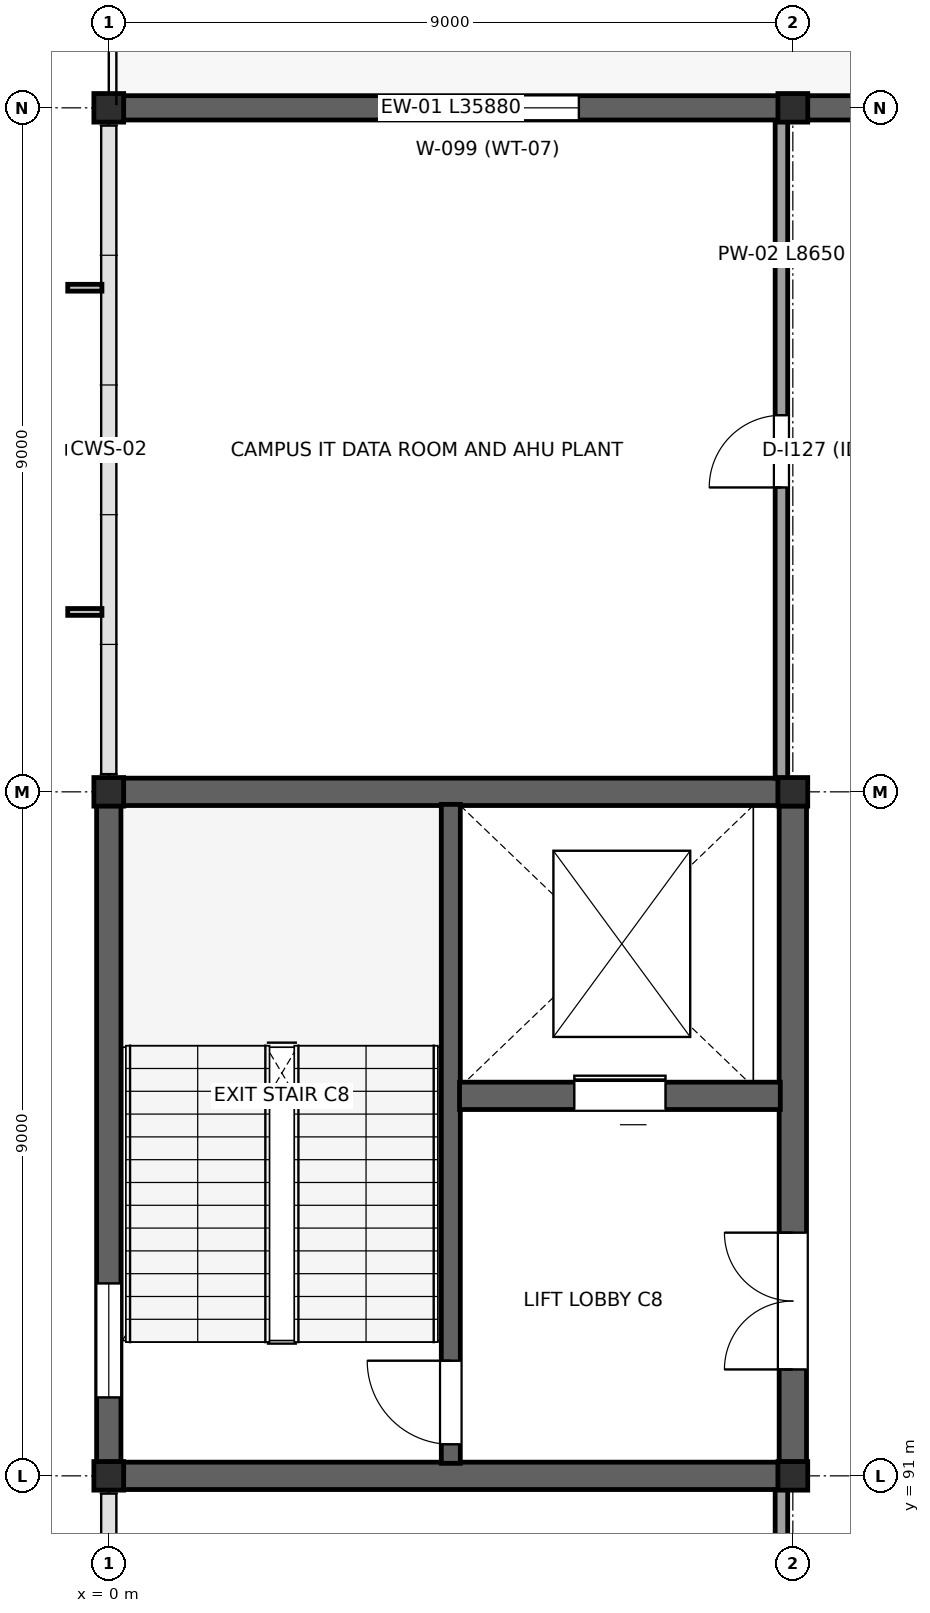
"""IFC4 building model, lengths in metres.
Left out: names, types, materials, properties, quantities, classifications, styles, units other than length and angle.
Written with IfcOpenShell. Run it as: python <this file> out.ifc"""

import sys

from ifc_helpers import new_model, si_unit, direction, frame, frame_2d, origin, origin_2d, place, context, subcontext, project, spatial, rectangle, i_section, extrude, element, fill, save


model = new_model("IFC4")
c1 = context("Model", 3, precision=1e-05, world=origin(), true_north=direction((0.0, 1.0)))
c2 = subcontext(c1, "Body", "Model", "MODEL_VIEW")
j1 = project(units=[si_unit("LENGTHUNIT", "METRE"), si_unit("PLANEANGLEUNIT", "RADIAN")], contexts=[c1])
p1 = place(None, origin())
s1 = spatial("IfcSite", under=j1, at=p1, CompositionType="ELEMENT")
p2 = place(p1, origin())
s2 = spatial("IfcBuilding", under=s1, at=p2, CompositionType="ELEMENT")
p3 = place(p2, frame((0.0, 0.0, 16.5)))
s3 = spatial("IfcBuildingStorey", under=s2, at=p3, CompositionType="ELEMENT", Elevation=16.5)
for number, where, z_axis, x_axis in (
    (1, (0.0, 91.0, 0.0), (0.0, 0.0, 1.0), (1.0, 0.0, 0.0)),
    (2, (0.0, 100.0, 0.0), (0.0, 0.0, 1.0), (1.0, 0.0, 0.0)),
    (3, (0.0, 109.0, 0.0), (0.0, 0.0, 1.0), (1.0, 0.0, 0.0)),
    (4, (9.0, 91.0, 0.0), (0.0, 0.0, 1.0), (1.0, 0.0, 0.0)),
    (5, (9.0, 100.0, 0.0), (0.0, 0.0, 1.0), (1.0, 0.0, 0.0)),
    (6, (9.0, 109.0, 0.0), (0.0, 0.0, 1.0), (1.0, 0.0, 0.0)),
):
    element("IfcColumn", number, at=place(p3, frame(where, z_axis=z_axis, x_axis=x_axis)), inside=s3, PredefinedType="COLUMN", context=c2, shape_type="SweptSolid", body=[
        extrude(i_section(OverallWidth=0.392, OverallDepth=0.376, WebThickness=0.017, FlangeThickness=0.028, at=origin_2d()), origin(), (0.0, 0.0, 1.0), 4.5),
    ])
p4 = place(p3, frame((0.0, 91.182, 0.0), z_axis=(0.0, 0.0, 1.0), x_axis=(0.0, 1.0, 0.0)))
e7 = element("IfcWall", 7, at=p4, inside=s3, PredefinedType="STANDARD", context=c2, shape_type="SweptSolid", body=[
    extrude(rectangle(XDim=8.636, YDim=0.32, at=frame_2d((4.318, 0.0))), origin(), (0.0, 0.0, 1.0), 4.28),
])
p5 = place(p4, frame((0.85, 0.0, 1.1)))
e8 = element("IfcOpeningElement", 8, at=p5, cuts=e7, PredefinedType="OPENING", context=c2, shape_type="SweptSolid", body=[
    extrude(rectangle(XDim=1.5, YDim=1.8, at=frame_2d((0.75, 0.9))), frame((0.0, 0.17, 0.0), z_axis=(0.0, -1.0, 0.0), x_axis=(1.0, 0.0, 0.0)), (0.0, 0.0, 1.0), 0.34),
])
p6 = place(p3, frame((0.015, 109.0, 0.0), z_axis=(0.0, 0.0, 1.0), x_axis=(1.0, 0.0, 0.0)))
e9 = element("IfcWall", 9, at=p6, inside=s3, PredefinedType="STANDARD", context=c2, shape_type="SweptSolid", body=[
    extrude(rectangle(XDim=8.97, YDim=0.32, at=frame_2d((4.485, 0.0))), origin(), (0.0, 0.0, 1.0), 4.28),
])
p7 = place(p6, frame((3.77, 0.0, 1.0)))
e10 = element("IfcOpeningElement", 10, at=p7, cuts=e9, PredefinedType="OPENING", context=c2, shape_type="SweptSolid", body=[
    extrude(rectangle(XDim=2.4, YDim=2.4, at=frame_2d((1.2, 1.2))), frame((0.0, 0.17, 0.0), z_axis=(0.0, -1.0, 0.0), x_axis=(1.0, 0.0, 0.0)), (0.0, 0.0, 1.0), 0.34),
])
p8 = place(p3, frame((9.015, 109.0, 0.0), z_axis=(0.0, 0.0, 1.0), x_axis=(1.0, 0.0, 0.0)))
e11 = element("IfcWall", 11, at=p8, inside=s3, PredefinedType="STANDARD", context=c2, shape_type="SweptSolid", body=[
    extrude(rectangle(XDim=8.97, YDim=0.32, at=frame_2d((4.485, 0.0))), origin(), (0.0, 0.0, 1.0), 4.28),
])
p9 = place(p3, frame((9.0, 91.183, 0.0), z_axis=(0.0, 0.0, 1.0), x_axis=(0.0, 1.0, 0.0)))
e12 = element("IfcWall", 12, at=p9, inside=s3, PredefinedType="SHEAR", context=c2, shape_type="SweptSolid", body=[
    extrude(rectangle(XDim=8.634, YDim=0.36, at=frame_2d((4.317, 0.0))), origin(), (0.0, 0.0, 1.0), 4.28),
])
p10 = place(p9, frame((1.217, 0.0, 0.0)))
e13 = element("IfcOpeningElement", 13, at=p10, cuts=e12, PredefinedType="OPENING", context=c2, shape_type="SweptSolid", body=[
    extrude(rectangle(XDim=1.8, YDim=2.3, at=frame_2d((0.9, 1.15))), frame((0.0, 0.19, 0.0), z_axis=(0.0, -1.0, 0.0), x_axis=(1.0, 0.0, 0.0)), (0.0, 0.0, 1.0), 0.38),
])
for number, where, z_axis, x_axis in (
    (14, (0.191, 91.0, 0.0), (0.0, 0.0, 1.0), (1.0, 0.0, 0.0)),
    (15, (0.191, 100.0, 0.0), (0.0, 0.0, 1.0), (1.0, 0.0, 0.0)),
):
    element("IfcWall", number, at=place(p3, frame(where, z_axis=z_axis, x_axis=x_axis)), inside=s3, PredefinedType="SHEAR", context=c2, shape_type="SweptSolid", body=[
        extrude(rectangle(XDim=8.618, YDim=0.36, at=frame_2d((4.309, 0.0))), origin(), (0.0, 0.0, 1.0), 4.28),
    ])
p11 = place(p3, frame((4.5, 91.165, 0.0), z_axis=(0.0, 0.0, 1.0), x_axis=(0.0, 1.0, 0.0)))
e16 = element("IfcWall", 16, at=p11, inside=s3, PredefinedType="SHEAR", context=c2, shape_type="SweptSolid", body=[
    extrude(rectangle(XDim=8.67, YDim=0.25, at=frame_2d((4.335, 0.0))), origin(), (0.0, 0.0, 1.0), 4.28),
])
p12 = place(p11, frame((0.25, 0.0, 0.0)))
e17 = element("IfcOpeningElement", 17, at=p12, cuts=e16, PredefinedType="OPENING", context=c2, shape_type="SweptSolid", body=[
    extrude(rectangle(XDim=1.1, YDim=2.2, at=frame_2d((0.55, 1.1))), frame((0.0, 0.135, 0.0), z_axis=(0.0, -1.0, 0.0), x_axis=(1.0, 0.0, 0.0)), (0.0, 0.0, 1.0), 0.27),
])
p13 = place(p3, frame((4.615, 96.0, 0.0), z_axis=(0.0, 0.0, 1.0), x_axis=(1.0, 0.0, 0.0)))
e18 = element("IfcWall", 18, at=p13, inside=s3, PredefinedType="SHEAR", context=c2, shape_type="SweptSolid", body=[
    extrude(rectangle(XDim=4.22, YDim=0.36, at=frame_2d((2.11, 0.0))), origin(), (0.0, 0.0, 1.0), 4.28),
])
p14 = place(p13, frame((1.51, 0.0, 0.0)))
e19 = element("IfcOpeningElement", 19, at=p14, cuts=e18, PredefinedType="OPENING", context=c2, shape_type="SweptSolid", body=[
    extrude(rectangle(XDim=1.2, YDim=2.3, at=frame_2d((0.6, 1.15))), frame((0.0, 0.19, 0.0), z_axis=(0.0, -1.0, 0.0), x_axis=(1.0, 0.0, 0.0)), (0.0, 0.0, 1.0), 0.38),
])
p15 = place(p3, frame((8.85, 63.78, 0.0), z_axis=(0.0, 0.0, 1.0), x_axis=(0.0, 1.0, 0.0)))
e20 = element("IfcWall", 20, at=p15, inside=s3, PredefinedType="PARTITIONING", context=c2, shape_type="SweptSolid", body=[
    extrude(rectangle(XDim=27.04, YDim=0.165, at=frame_2d((13.52, 0.0))), origin(), (0.0, 0.0, 1.0), 3.5),
])
p16 = place(p15, frame((2.72, 0.0, 0.0)))
e21 = element("IfcOpeningElement", 21, at=p16, cuts=e20, PredefinedType="OPENING", context=c2, shape_type="SweptSolid", body=[
    extrude(rectangle(XDim=0.98, YDim=2.15, at=frame_2d((0.49, 1.075))), frame((0.0, 0.093, 0.0), z_axis=(0.0, -1.0, 0.0), x_axis=(1.0, 0.0, 0.0)), (0.0, 0.0, 1.0), 0.185),
])
p17 = place(p15, frame((5.52, 0.0, 0.0)))
e22 = element("IfcOpeningElement", 22, at=p17, cuts=e20, PredefinedType="OPENING", context=c2, shape_type="SweptSolid", body=[
    extrude(rectangle(XDim=1.02, YDim=2.16, at=frame_2d((0.51, 1.08))), frame((0.0, 0.093, 0.0), z_axis=(0.0, -1.0, 0.0), x_axis=(1.0, 0.0, 0.0)), (0.0, 0.0, 1.0), 0.185),
])
p18 = place(p15, frame((13.72, 0.0, 0.0)))
e23 = element("IfcOpeningElement", 23, at=p18, cuts=e20, PredefinedType="OPENING", context=c2, shape_type="SweptSolid", body=[
    extrude(rectangle(XDim=0.95, YDim=2.12, at=frame_2d((0.475, 1.06))), frame((0.0, 0.093, 0.0), z_axis=(0.0, -1.0, 0.0), x_axis=(1.0, 0.0, 0.0)), (0.0, 0.0, 1.0), 0.185),
])
p19 = place(p3, frame((8.85, 100.18, 0.0), z_axis=(0.0, 0.0, 1.0), x_axis=(0.0, 1.0, 0.0)))
e24 = element("IfcWall", 24, at=p19, inside=s3, PredefinedType="PARTITIONING", context=c2, shape_type="SweptSolid", body=[
    extrude(rectangle(XDim=8.65, YDim=0.165, at=frame_2d((4.325, 0.0))), origin(), (0.0, 0.0, 1.0), 3.5),
])
p20 = place(p19, frame((3.825, 0.0, 0.0)))
e25 = element("IfcOpeningElement", 25, at=p20, cuts=e24, PredefinedType="OPENING", context=c2, shape_type="SweptSolid", body=[
    extrude(rectangle(XDim=0.95, YDim=2.12, at=frame_2d((0.475, 1.06))), frame((0.0, 0.093, 0.0), z_axis=(0.0, -1.0, 0.0), x_axis=(1.0, 0.0, 0.0)), (0.0, 0.0, 1.0), 0.185),
])
p21 = place(p5, origin())
e26 = element("IfcWindow", 26, at=p21, inside=s3, PartitioningType="SINGLE_PANEL", PredefinedType="WINDOW", context=c2, shape_type="SweptSolid", body=[
    extrude(rectangle(XDim=1.5, YDim=1.8, at=frame_2d((0.75, 0.9))), frame((0.0, 0.03, 0.0), z_axis=(0.0, -1.0, 0.0), x_axis=(1.0, 0.0, 0.0)), (0.0, 0.0, 1.0), 0.06),
])
fill(e8, e26)
p22 = place(p7, origin())
e27 = element("IfcWindow", 27, at=p22, inside=s3, PartitioningType="SINGLE_PANEL", PredefinedType="WINDOW", context=c2, shape_type="SweptSolid", body=[
    extrude(rectangle(XDim=2.4, YDim=2.4, at=frame_2d((1.2, 1.2))), frame((0.0, 0.03, 0.0), z_axis=(0.0, -1.0, 0.0), x_axis=(1.0, 0.0, 0.0)), (0.0, 0.0, 1.0), 0.06),
])
fill(e10, e27)
p23 = place(p12, origin())
e28 = element("IfcDoor", 28, at=p23, inside=s3, OperationType="SINGLE_SWING_RIGHT", PredefinedType="DOOR", context=c2, shape_type="SweptSolid", body=[
    extrude(rectangle(XDim=1.1, YDim=2.2, at=frame_2d((0.55, 1.1))), frame((0.0, 0.025, 0.0), z_axis=(0.0, -1.0, 0.0), x_axis=(1.0, 0.0, 0.0)), (0.0, 0.0, 1.0), 0.05),
])
fill(e17, e28)
p24 = place(p14, origin())
e29 = element("IfcDoor", 29, at=p24, inside=s3, OperationType="SLIDING_TO_RIGHT", PredefinedType="DOOR", context=c2, shape_type="SweptSolid", body=[
    extrude(rectangle(XDim=1.2, YDim=2.3, at=frame_2d((0.6, 1.15))), frame((0.0, 0.025, 0.0), z_axis=(0.0, -1.0, 0.0), x_axis=(1.0, 0.0, 0.0)), (0.0, 0.0, 1.0), 0.05),
])
fill(e19, e29)
p25 = place(p10, origin())
e30 = element("IfcDoor", 30, at=p25, inside=s3, OperationType="DOUBLE_DOOR_SINGLE_SWING", PredefinedType="DOOR", context=c2, shape_type="SweptSolid", body=[
    extrude(rectangle(XDim=1.8, YDim=2.3, at=frame_2d((0.9, 1.15))), frame((0.0, 0.025, 0.0), z_axis=(0.0, -1.0, 0.0), x_axis=(1.0, 0.0, 0.0)), (0.0, 0.0, 1.0), 0.05),
])
fill(e13, e30)
p26 = place(p20, origin())
e31 = element("IfcDoor", 31, at=p26, inside=s3, OperationType="SINGLE_SWING_LEFT", PredefinedType="DOOR", context=c2, shape_type="SweptSolid", body=[
    extrude(rectangle(XDim=0.95, YDim=2.12, at=frame_2d((0.475, 1.06))), frame((0.0, 0.025, 0.0), z_axis=(0.0, -1.0, 0.0), x_axis=(1.0, 0.0, 0.0)), (0.0, 0.0, 1.0), 0.05),
])
fill(e25, e31)
save(model, sys.argv[1])
